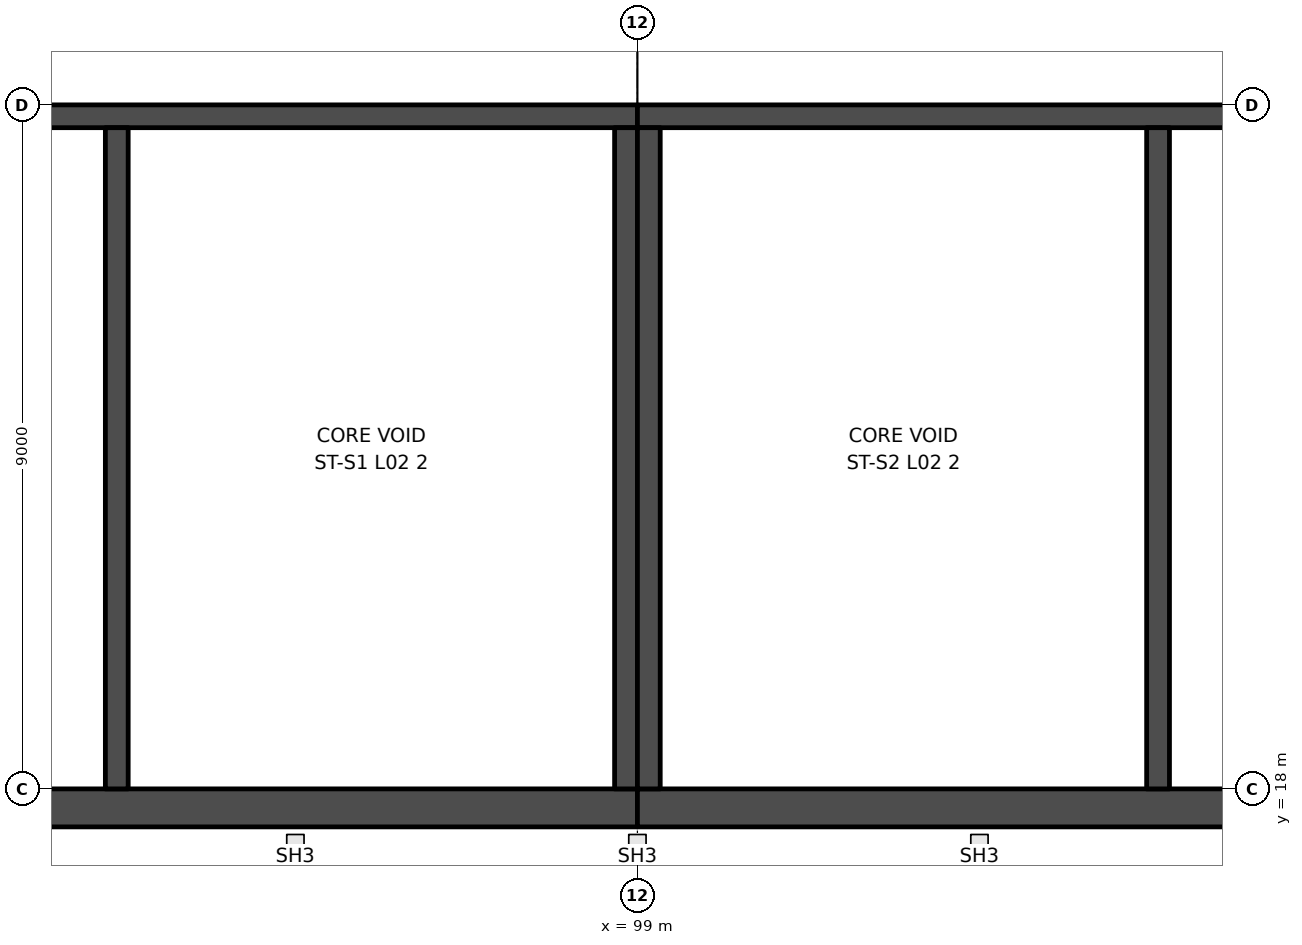
"""IFC4 building model, lengths in metres.
Left out: names, types, materials, properties, quantities, classifications, styles, units other than length and angle.
Written with IfcOpenShell. Run it as: python <this file> out.ifc"""

import sys

from ifc_helpers import new_model, si_unit, direction, frame, frame_2d, origin, place, context, subcontext, project, spatial, rectangle, extrude, element, save


model = new_model("IFC4")
c1 = context("Model", 3, precision=1e-05, world=origin(), true_north=direction((0.0, 1.0)))
c2 = subcontext(c1, "Body", "Model", "MODEL_VIEW")
j1 = project(units=[si_unit("LENGTHUNIT", "METRE"), si_unit("PLANEANGLEUNIT", "RADIAN")], contexts=[c1])
p1 = place(None, origin())
s1 = spatial("IfcSite", under=j1, at=p1, CompositionType="ELEMENT")
p2 = place(p1, origin())
s2 = spatial("IfcBuilding", under=s1, at=p2, CompositionType="ELEMENT")
p3 = place(p2, frame((0.0, 0.0, 11.5)))
s3 = spatial("IfcBuildingStorey", under=s2, at=p3, CompositionType="ELEMENT", Elevation=11.5)
p4 = place(p3, frame((81.0, 26.85, 0.0), z_axis=(0.0, 0.0, 1.0), x_axis=(1.0, 0.0, 0.0)))
e1 = element("IfcWall", 1, at=p4, inside=s3, PredefinedType="SHEAR", context=c2, shape_type="SweptSolid", body=[
    extrude(rectangle(XDim=18.0, YDim=0.3, at=frame_2d((9.0, 0.0))), origin(), (0.0, 0.0, 1.0), 10.5),
])
p5 = place(p4, frame((8.6, 0.0, 0.0)))
e2 = element("IfcOpeningElement", 2, at=p5, cuts=e1, PredefinedType="OPENING", context=c2, shape_type="SweptSolid", body=[
    extrude(rectangle(XDim=1.2, YDim=2.1, at=frame_2d((0.6, 1.05))), frame((0.0, 0.16, 0.0), z_axis=(0.0, -1.0, 0.0), x_axis=(1.0, 0.0, 0.0)), (0.0, 0.0, 1.0), 0.32),
])
p6 = place(p3, frame((81.0, 17.75, 0.0), z_axis=(0.0, 0.0, 1.0), x_axis=(1.0, 0.0, 0.0)))
e3 = element("IfcWall", 3, at=p6, inside=s3, PredefinedType="SHEAR", context=c2, shape_type="SweptSolid", body=[
    extrude(rectangle(XDim=18.0, YDim=0.5, at=frame_2d((9.0, 0.0))), origin(), (0.0, 0.0, 1.0), 10.5),
])
for number, where, z_axis, x_axis in (
    (4, (98.85, 26.7, 0.0), (0.0, 0.0, 1.0), (0.0, -1.0, 0.0)),
    (5, (92.15, 26.7, 0.0), (0.0, 0.0, 1.0), (0.0, -1.0, 0.0)),
):
    element("IfcWall", number, at=place(p3, frame(where, z_axis=z_axis, x_axis=x_axis)), inside=s3, PredefinedType="SHEAR", context=c2, shape_type="SweptSolid", body=[
        extrude(rectangle(XDim=8.7, YDim=0.3, at=frame_2d((4.35, 0.0))), origin(), (0.0, 0.0, 1.0), 10.5),
    ])
p7 = place(p3, frame((117.0, 26.85, 0.0), z_axis=(0.0, 0.0, 1.0), x_axis=(-1.0, 0.0, 0.0)))
e6 = element("IfcWall", 6, at=p7, inside=s3, PredefinedType="SHEAR", context=c2, shape_type="SweptSolid", body=[
    extrude(rectangle(XDim=18.0, YDim=0.3, at=frame_2d((9.0, 0.0))), origin(), (0.0, 0.0, 1.0), 10.5),
])
p8 = place(p7, frame((1.5, 0.0, 0.0)))
e7 = element("IfcOpeningElement", 7, at=p8, cuts=e6, PredefinedType="OPENING", context=c2, shape_type="SweptSolid", body=[
    extrude(rectangle(XDim=1.2, YDim=2.1, at=frame_2d((0.6, 1.05))), frame((0.0, 0.16, 0.0), z_axis=(0.0, -1.0, 0.0), x_axis=(1.0, 0.0, 0.0)), (0.0, 0.0, 1.0), 0.32),
])
p9 = place(p3, frame((117.0, 17.75, 0.0), z_axis=(0.0, 0.0, 1.0), x_axis=(-1.0, 0.0, 0.0)))
e8 = element("IfcWall", 8, at=p9, inside=s3, PredefinedType="SHEAR", context=c2, shape_type="SweptSolid", body=[
    extrude(rectangle(XDim=18.0, YDim=0.5, at=frame_2d((9.0, 0.0))), origin(), (0.0, 0.0, 1.0), 10.5),
])
for number, where, z_axis, x_axis in (
    (9, (99.15, 26.7, 0.0), (0.0, 0.0, 1.0), (0.0, -1.0, 0.0)),
    (10, (105.85, 26.7, 0.0), (0.0, 0.0, 1.0), (0.0, -1.0, 0.0)),
):
    element("IfcWall", number, at=place(p3, frame(where, z_axis=z_axis, x_axis=x_axis)), inside=s3, PredefinedType="SHEAR", context=c2, shape_type="SweptSolid", body=[
        extrude(rectangle(XDim=8.7, YDim=0.3, at=frame_2d((4.35, 0.0))), origin(), (0.0, 0.0, 1.0), 10.5),
    ])
save(model, sys.argv[1])
